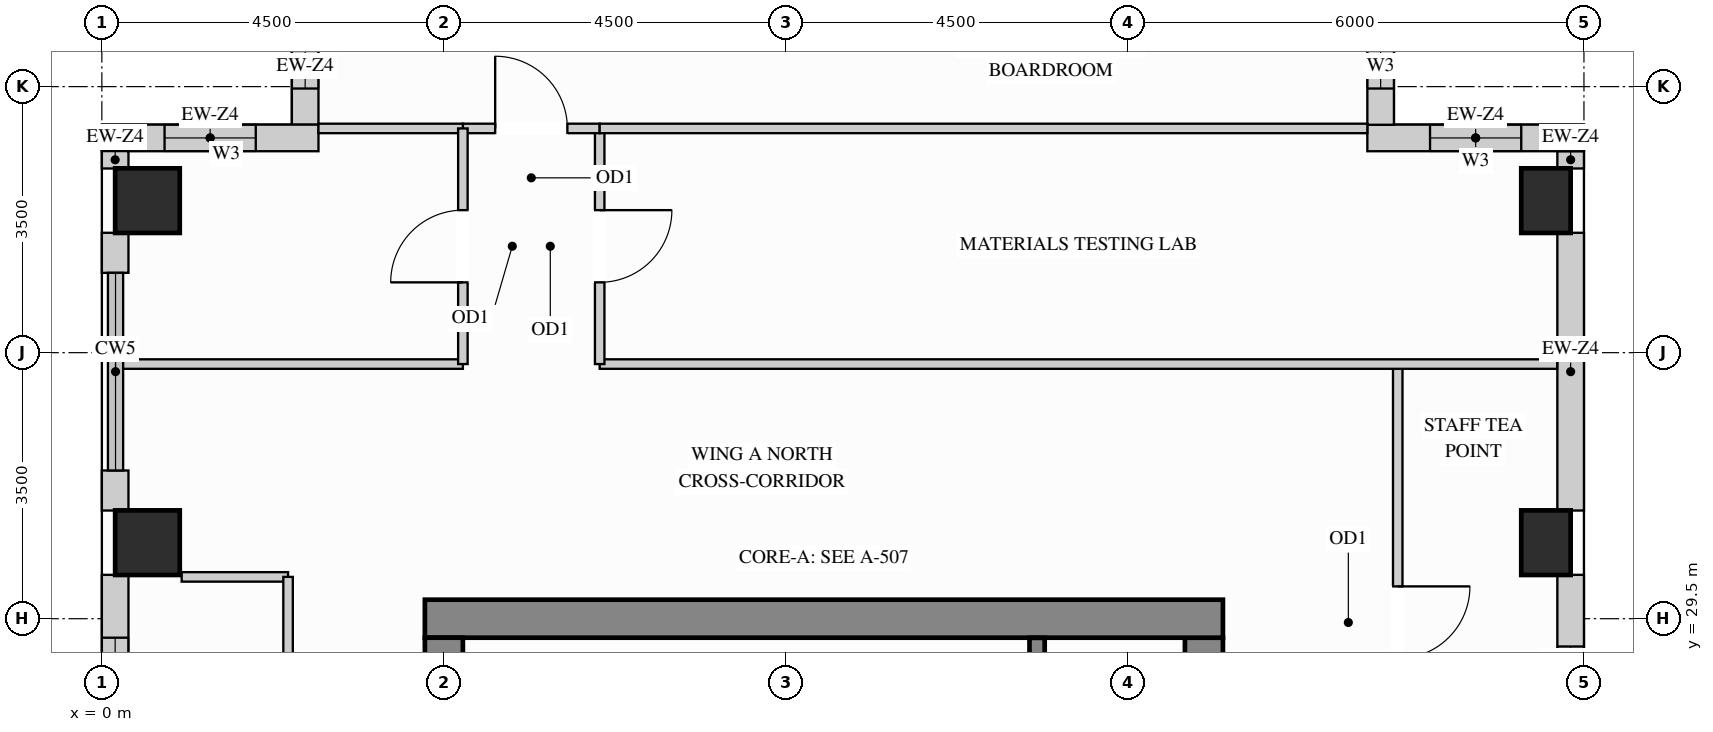
"""IFC4 building model, lengths in metres.
Left out: names, types, materials, properties, quantities, classifications, styles, units other than length and angle.
Written with IfcOpenShell. Run it as: python <this file> out.ifc"""

import sys

from ifc_helpers import new_model, si_unit, direction, frame, frame_2d, origin, origin_2d, place, context, subcontext, project, spatial, rectangle, extrude, source, transform, mapped, element, fill, save


model = new_model("IFC4")
c1 = context("Model", 3, precision=1e-05, world=origin(), true_north=direction((0.0, 1.0)))
c2 = subcontext(c1, "Body", "Model", "MODEL_VIEW")
j1 = project(units=[si_unit("LENGTHUNIT", "METRE"), si_unit("PLANEANGLEUNIT", "RADIAN")], contexts=[c1])
p1 = place(None, origin())
s1 = spatial("IfcSite", under=j1, at=p1, CompositionType="ELEMENT")
p2 = place(p1, origin())
s2 = spatial("IfcBuilding", under=s1, at=p2, CompositionType="ELEMENT")
p3 = place(p2, frame((0.0, 0.0, 252.0)))
s3 = spatial("IfcBuildingStorey", under=s2, at=p3, CompositionType="ELEMENT", Elevation=252.0)
m1 = source(origin(), c2, "Body", "SweptSolid", [
    extrude(rectangle(XDim=0.65, YDim=0.85, at=origin_2d()), origin(), (0.0, 0.0, 1.0), 3.4),
])
for number, where, z_axis, x_axis in (
    (1, (19.0, 30.5, 0.0), (0.0, 0.0, 1.0), (1.0, 0.0, 0.0)),
    (2, (19.0, 35.0, 0.0), (0.0, 0.0, 1.0), (1.0, 0.0, 0.0)),
):
    element("IfcColumn", number, at=place(p3, frame(where, z_axis=z_axis, x_axis=x_axis)), inside=s3, PredefinedType="COLUMN", context=c2, shape_type="MappedRepresentation", body=[
        mapped(m1, transform((0.0, 0.0, 0.0), x_axis=(1.0, 0.0, 0.0), y_axis=(0.0, 1.0, 0.0), z_axis=(0.0, 0.0, 1.0))),
    ])
m2 = source(origin(), c2, "Body", "SweptSolid", [
    extrude(rectangle(XDim=0.85, YDim=0.85, at=origin_2d()), origin(), (0.0, 0.0, 1.0), 3.4),
])
for number, where, z_axis, x_axis in (
    (3, (0.6, 30.5, 0.0), (0.0, 0.0, 1.0), (1.0, 0.0, 0.0)),
    (4, (0.6, 35.0, 0.0), (0.0, 0.0, 1.0), (1.0, 0.0, 0.0)),
):
    element("IfcColumn", number, at=place(p3, frame(where, z_axis=z_axis, x_axis=x_axis)), inside=s3, PredefinedType="COLUMN", context=c2, shape_type="MappedRepresentation", body=[
        mapped(m2, transform((0.0, 0.0, 0.0), x_axis=(1.0, 0.0, 0.0), y_axis=(0.0, 1.0, 0.0), z_axis=(0.0, 0.0, 1.0))),
    ])
m3 = source(origin(), c2, "Body", "SweptSolid", [
    extrude(rectangle(XDim=8.37, YDim=0.5, at=frame_2d((4.185, 0.0))), origin(), (0.0, 0.0, 1.0), 3.4),
])
p4 = place(p3, frame((14.5, 20.88, 0.0), z_axis=(0.0, 0.0, 1.0), x_axis=(0.0, 1.0, 0.0)))
e5 = element("IfcWall", 5, at=p4, inside=s3, PredefinedType="SHEAR", context=c2, shape_type="MappedRepresentation", body=[
    mapped(m3, transform((0.0, 0.0, 0.0), x_axis=(1.0, 0.0, 0.0), y_axis=(0.0, 1.0, 0.0), z_axis=(0.0, 0.0, 1.0))),
])
m4 = source(origin(), c2, "Body", "SweptSolid", [
    extrude(rectangle(XDim=10.5, YDim=0.5, at=frame_2d((5.25, 0.0))), origin(), (0.0, 0.0, 1.0), 3.4),
])
p5 = place(p3, frame((4.25, 29.5, 0.0), z_axis=(0.0, 0.0, 1.0), x_axis=(1.0, 0.0, 0.0)))
e6 = element("IfcWall", 6, at=p5, inside=s3, PredefinedType="SHEAR", context=c2, shape_type="MappedRepresentation", body=[
    mapped(m4, transform((0.0, 0.0, 0.0), x_axis=(1.0, 0.0, 0.0), y_axis=(0.0, 1.0, 0.0), z_axis=(0.0, 0.0, 1.0))),
])
m5 = source(origin(), c2, "Body", "SweptSolid", [
    extrude(rectangle(XDim=20.5, YDim=0.5, at=frame_2d((10.25, 0.0))), origin(), (0.0, 0.0, 1.0), 3.4),
])
p6 = place(p3, frame((4.5, 8.75, 0.0), z_axis=(0.0, 0.0, 1.0), x_axis=(0.0, 1.0, 0.0)))
e7 = element("IfcWall", 7, at=p6, inside=s3, PredefinedType="SHEAR", context=c2, shape_type="MappedRepresentation", body=[
    mapped(m5, transform((0.0, 0.0, 0.0), x_axis=(1.0, 0.0, 0.0), y_axis=(0.0, 1.0, 0.0), z_axis=(0.0, 0.0, 1.0))),
])
p7 = place(p3, frame((19.325, 27.223, 0.0), z_axis=(0.0, 0.0, 1.0), x_axis=(0.0, 1.0, 0.0)))
e8 = element("IfcWall", 8, at=p7, inside=s3, PredefinedType="SOLIDWALL", context=c2, shape_type="SweptSolid", body=[
    extrude(rectangle(XDim=2.854, YDim=0.35, at=frame_2d((1.427, 0.0))), origin(), (0.0, 0.0, 1.0), 2.619),
])
p8 = place(p7, frame((0.411, 0.0, 0.78)))
e9 = element("IfcOpeningElement", 9, at=p8, cuts=e8, PredefinedType="OPENING", context=c2, shape_type="SweptSolid", body=[
    extrude(rectangle(XDim=1.5, YDim=1.659, at=frame_2d((0.75, 0.83))), frame((0.0, 0.185, 0.0), z_axis=(0.0, -1.0, 0.0), x_axis=(1.0, 0.0, 0.0)), (0.0, 0.0, 1.0), 0.37),
])
m6 = source(origin(), c2, "Body", "SweptSolid", [
    extrude(rectangle(XDim=3.654, YDim=0.35, at=frame_2d((1.827, 0.0))), origin(), (0.0, 0.0, 1.0), 2.619),
])
p9 = place(p3, frame((19.325, 30.923, 0.0), z_axis=(0.0, 0.0, 1.0), x_axis=(0.0, 1.0, 0.0)))
e10 = element("IfcWall", 10, at=p9, inside=s3, PredefinedType="SOLIDWALL", context=c2, shape_type="MappedRepresentation", body=[
    mapped(m6, transform((0.0, 0.0, 0.0), x_axis=(1.0, 0.0, 0.0), y_axis=(0.0, 1.0, 0.0), z_axis=(0.0, 0.0, 1.0))),
])
m7 = source(origin(), c2, "Body", "SweptSolid", [
    extrude(rectangle(XDim=0.229, YDim=0.35, at=frame_2d((0.115, 0.0))), origin(), (0.0, 0.0, 1.0), 3.385),
])
p10 = place(p3, frame((19.325, 35.423, 0.0), z_axis=(0.0, 0.0, 1.0), x_axis=(0.0, 1.0, 0.0)))
e11 = element("IfcWall", 11, at=p10, inside=s3, PredefinedType="SOLIDWALL", context=c2, shape_type="MappedRepresentation", body=[
    mapped(m7, transform((0.0, 0.0, 0.0), x_axis=(1.0, 0.0, 0.0), y_axis=(0.0, 1.0, 0.0), z_axis=(0.0, 0.0, 1.0))),
])
p11 = place(p3, frame((19.5, 35.825, 0.0), z_axis=(0.0, 0.0, 1.0), x_axis=(-1.0, 0.0, 0.0)))
e12 = element("IfcWall", 12, at=p11, inside=s3, PredefinedType="SOLIDWALL", context=c2, shape_type="SweptSolid", body=[
    extrude(rectangle(XDim=2.85, YDim=0.35, at=frame_2d((1.425, 0.0))), origin(), (0.0, 0.0, 1.0), 3.385),
])
p12 = place(p11, frame((0.825, 0.0, 0.78)))
e13 = element("IfcOpeningElement", 13, at=p12, cuts=e12, PredefinedType="OPENING", context=c2, shape_type="SweptSolid", body=[
    extrude(rectangle(XDim=1.2, YDim=2.25, at=frame_2d((0.6, 1.125))), frame((0.0, 0.185, 0.0), z_axis=(0.0, -1.0, 0.0), x_axis=(1.0, 0.0, 0.0)), (0.0, 0.0, 1.0), 0.37),
])
p13 = place(p3, frame((16.825, 35.998, 0.0), z_axis=(0.0, 0.0, 1.0), x_axis=(0.0, 1.0, 0.0)))
e14 = element("IfcWall", 14, at=p13, inside=s3, PredefinedType="SOLIDWALL", context=c2, shape_type="SweptSolid", body=[
    extrude(rectangle(XDim=2.154, YDim=0.35, at=frame_2d((1.077, 0.0))), origin(), (0.0, 0.0, 1.0), 3.385),
])
p14 = place(p13, frame((0.477, 0.0, 0.78)))
e15 = element("IfcOpeningElement", 15, at=p14, cuts=e14, PredefinedType="OPENING", context=c2, shape_type="SweptSolid", body=[
    extrude(rectangle(XDim=1.2, YDim=2.25, at=frame_2d((0.6, 1.125))), frame((0.0, 0.185, 0.0), z_axis=(0.0, -1.0, 0.0), x_axis=(1.0, 0.0, 0.0)), (0.0, 0.0, 1.0), 0.37),
])
p15 = place(p3, frame((2.675, 38.152, 0.0), z_axis=(0.0, 0.0, 1.0), x_axis=(0.0, -1.0, 0.0)))
e16 = element("IfcWall", 16, at=p15, inside=s3, PredefinedType="SOLIDWALL", context=c2, shape_type="SweptSolid", body=[
    extrude(rectangle(XDim=2.154, YDim=0.35, at=frame_2d((1.077, 0.0))), origin(), (0.0, 0.0, 1.0), 3.385),
])
p16 = place(p15, frame((0.477, 0.0, 0.78)))
e17 = element("IfcOpeningElement", 17, at=p16, cuts=e16, PredefinedType="OPENING", context=c2, shape_type="SweptSolid", body=[
    extrude(rectangle(XDim=1.2, YDim=2.25, at=frame_2d((0.6, 1.125))), frame((0.0, 0.185, 0.0), z_axis=(0.0, -1.0, 0.0), x_axis=(1.0, 0.0, 0.0)), (0.0, 0.0, 1.0), 0.37),
])
p17 = place(p3, frame((2.85, 35.825, 0.0), z_axis=(0.0, 0.0, 1.0), x_axis=(-1.0, 0.0, 0.0)))
e18 = element("IfcWall", 18, at=p17, inside=s3, PredefinedType="SOLIDWALL", context=c2, shape_type="SweptSolid", body=[
    extrude(rectangle(XDim=2.85, YDim=0.35, at=frame_2d((1.425, 0.0))), origin(), (0.0, 0.0, 1.0), 3.385),
])
p18 = place(p17, frame((0.825, 0.0, 0.78)))
e19 = element("IfcOpeningElement", 19, at=p18, cuts=e18, PredefinedType="OPENING", context=c2, shape_type="SweptSolid", body=[
    extrude(rectangle(XDim=1.2, YDim=2.25, at=frame_2d((0.6, 1.125))), frame((0.0, 0.185, 0.0), z_axis=(0.0, -1.0, 0.0), x_axis=(1.0, 0.0, 0.0)), (0.0, 0.0, 1.0), 0.37),
])
p19 = place(p3, frame((0.175, 35.652, 0.0), z_axis=(0.0, 0.0, 1.0), x_axis=(0.0, -1.0, 0.0)))
e20 = element("IfcWall", 20, at=p19, inside=s3, PredefinedType="SOLIDWALL", context=c2, shape_type="MappedRepresentation", body=[
    mapped(m7, transform((0.0, 0.0, 0.0), x_axis=(1.0, 0.0, 0.0), y_axis=(0.0, 1.0, 0.0), z_axis=(0.0, 0.0, 1.0))),
])
m8 = source(origin(), c2, "Body", "SweptSolid", [
    extrude(rectangle(XDim=0.527, YDim=0.35, at=frame_2d((0.263, 0.0))), origin(), (0.0, 0.0, 1.0), 3.385),
])
for number, where, z_axis, x_axis in (
    (21, (0.175, 34.577, 0.0), (0.0, 0.0, 1.0), (0.0, -1.0, 0.0)),
    (22, (0.175, 31.45, 0.0), (0.0, 0.0, 1.0), (0.0, -1.0, 0.0)),
):
    element("IfcWall", number, at=place(p3, frame(where, z_axis=z_axis, x_axis=x_axis)), inside=s3, PredefinedType="SOLIDWALL", context=c2, shape_type="MappedRepresentation", body=[
        mapped(m8, transform((0.0, 0.0, 0.0), x_axis=(1.0, 0.0, 0.0), y_axis=(0.0, 1.0, 0.0), z_axis=(0.0, 0.0, 1.0))),
    ])
p20 = place(p3, frame((0.175, 30.077, 0.0), z_axis=(0.0, 0.0, 1.0), x_axis=(0.0, -1.0, 0.0)))
e23 = element("IfcWall", 23, at=p20, inside=s3, PredefinedType="SOLIDWALL", context=c2, shape_type="SweptSolid", body=[
    extrude(rectangle(XDim=2.854, YDim=0.35, at=frame_2d((1.427, 0.0))), origin(), (0.0, 0.0, 1.0), 3.385),
])
p21 = place(p20, frame((0.827, 0.0, 0.78)))
e24 = element("IfcOpeningElement", 24, at=p21, cuts=e23, PredefinedType="OPENING", context=c2, shape_type="SweptSolid", body=[
    extrude(rectangle(XDim=1.2, YDim=2.25, at=frame_2d((0.6, 1.125))), frame((0.0, 0.185, 0.0), z_axis=(0.0, -1.0, 0.0), x_axis=(1.0, 0.0, 0.0)), (0.0, 0.0, 1.0), 0.37),
])
p22 = place(p3, frame((17.05, 26.05, 0.0), z_axis=(0.0, 0.0, 1.0), x_axis=(0.0, 1.0, 0.0)))
e25 = element("IfcWall", 25, at=p22, inside=s3, PredefinedType="PARTITIONING", context=c2, shape_type="SweptSolid", body=[
    extrude(rectangle(XDim=6.8, YDim=0.125, at=frame_2d((3.4, 0.0))), origin(), (0.0, 0.0, 1.0), 3.385),
])
p23 = place(p22, frame((2.925, 0.0, 0.0)))
e26 = element("IfcOpeningElement", 26, at=p23, cuts=e25, PredefinedType="OPENING", context=c2, shape_type="SweptSolid", body=[
    extrude(rectangle(XDim=0.95, YDim=2.15, at=frame_2d((0.475, 1.075))), frame((0.0, 0.073, 0.0), z_axis=(0.0, -1.0, 0.0), x_axis=(1.0, 0.0, 0.0)), (0.0, 0.0, 1.0), 0.145),
])
m9 = source(origin(), c2, "Body", "SweptSolid", [
    extrude(rectangle(XDim=12.598, YDim=0.125, at=frame_2d((6.299, 0.0))), origin(), (0.0, 0.0, 1.0), 3.385),
])
p24 = place(p3, frame((6.55, 32.85, 0.0), z_axis=(0.0, 0.0, 1.0), x_axis=(1.0, 0.0, 0.0)))
e27 = element("IfcWall", 27, at=p24, inside=s3, PredefinedType="PARTITIONING", context=c2, shape_type="MappedRepresentation", body=[
    mapped(m9, transform((0.0, 0.0, 0.0), x_axis=(1.0, 0.0, 0.0), y_axis=(0.0, 1.0, 0.0), z_axis=(0.0, 0.0, 1.0))),
])
m10 = source(origin(), c2, "Body", "SweptSolid", [
    extrude(rectangle(XDim=4.54, YDim=0.125, at=frame_2d((2.27, 0.0))), origin(), (0.0, 0.0, 1.0), 3.385),
])
p25 = place(p3, frame((0.21, 32.85, 0.0), z_axis=(0.0, 0.0, 1.0), x_axis=(1.0, 0.0, 0.0)))
e28 = element("IfcWall", 28, at=p25, inside=s3, PredefinedType="PARTITIONING", context=c2, shape_type="MappedRepresentation", body=[
    mapped(m10, transform((0.0, 0.0, 0.0), x_axis=(1.0, 0.0, 0.0), y_axis=(0.0, 1.0, 0.0), z_axis=(0.0, 0.0, 1.0))),
])
m11 = source(origin(), c2, "Body", "SweptSolid", [
    extrude(rectangle(XDim=1.4, YDim=0.125, at=frame_2d((0.7, 0.0))), origin(), (0.0, 0.0, 1.0), 3.385),
])
p26 = place(p3, frame((1.05, 30.05, 0.0), z_axis=(0.0, 0.0, 1.0), x_axis=(1.0, 0.0, 0.0)))
e29 = element("IfcWall", 29, at=p26, inside=s3, PredefinedType="PARTITIONING", context=c2, shape_type="MappedRepresentation", body=[
    mapped(m11, transform((0.0, 0.0, 0.0), x_axis=(1.0, 0.0, 0.0), y_axis=(0.0, 1.0, 0.0), z_axis=(0.0, 0.0, 1.0))),
])
p27 = place(p3, frame((6.55, 32.85, 0.0), z_axis=(0.0, 0.0, 1.0), x_axis=(0.0, 1.0, 0.0)))
e30 = element("IfcWall", 30, at=p27, inside=s3, PredefinedType="PARTITIONING", context=c2, shape_type="SweptSolid", body=[
    extrude(rectangle(XDim=3.1, YDim=0.125, at=frame_2d((1.55, 0.0))), origin(), (0.0, 0.0, 1.0), 3.385),
])
p28 = place(p27, frame((1.075, 0.0, 0.0)))
e31 = element("IfcOpeningElement", 31, at=p28, cuts=e30, PredefinedType="OPENING", context=c2, shape_type="SweptSolid", body=[
    extrude(rectangle(XDim=0.95, YDim=2.15, at=frame_2d((0.475, 1.075))), frame((0.0, 0.073, 0.0), z_axis=(0.0, -1.0, 0.0), x_axis=(1.0, 0.0, 0.0)), (0.0, 0.0, 1.0), 0.145),
])
p29 = place(p3, frame((4.75, 35.95, 0.0), z_axis=(0.0, 0.0, 1.0), x_axis=(1.0, 0.0, 0.0)))
e32 = element("IfcWall", 32, at=p29, inside=s3, PredefinedType="PARTITIONING", context=c2, shape_type="SweptSolid", body=[
    extrude(rectangle(XDim=1.8, YDim=0.125, at=frame_2d((0.9, 0.0))), origin(), (0.0, 0.0, 1.0), 3.385),
])
p30 = place(p29, frame((0.425, 0.0, 0.0)))
e33 = element("IfcOpeningElement", 33, at=p30, cuts=e32, PredefinedType="OPENING", context=c2, shape_type="SweptSolid", body=[
    extrude(rectangle(XDim=0.95, YDim=2.15, at=frame_2d((0.475, 1.075))), frame((0.0, 0.073, 0.0), z_axis=(0.0, -1.0, 0.0), x_axis=(1.0, 0.0, 0.0)), (0.0, 0.0, 1.0), 0.145),
])
m12 = source(origin(), c2, "Body", "SweptSolid", [
    extrude(rectangle(XDim=10.1, YDim=0.125, at=frame_2d((5.05, 0.0))), origin(), (0.0, 0.0, 1.0), 3.385),
])
p31 = place(p3, frame((6.55, 35.95, 0.0), z_axis=(0.0, 0.0, 1.0), x_axis=(1.0, 0.0, 0.0)))
e34 = element("IfcWall", 34, at=p31, inside=s3, PredefinedType="PARTITIONING", context=c2, shape_type="MappedRepresentation", body=[
    mapped(m12, transform((0.0, 0.0, 0.0), x_axis=(1.0, 0.0, 0.0), y_axis=(0.0, 1.0, 0.0), z_axis=(0.0, 0.0, 1.0))),
])
m13 = source(origin(), c2, "Body", "SweptSolid", [
    extrude(rectangle(XDim=1.9, YDim=0.125, at=frame_2d((0.95, 0.0))), origin(), (0.0, 0.0, 1.0), 3.385),
])
p32 = place(p3, frame((2.85, 35.95, 0.0), z_axis=(0.0, 0.0, 1.0), x_axis=(1.0, 0.0, 0.0)))
e35 = element("IfcWall", 35, at=p32, inside=s3, PredefinedType="PARTITIONING", context=c2, shape_type="MappedRepresentation", body=[
    mapped(m13, transform((0.0, 0.0, 0.0), x_axis=(1.0, 0.0, 0.0), y_axis=(0.0, 1.0, 0.0), z_axis=(0.0, 0.0, 1.0))),
])
p33 = place(p3, frame((4.75, 32.85, 0.0), z_axis=(0.0, 0.0, 1.0), x_axis=(0.0, 1.0, 0.0)))
e36 = element("IfcWall", 36, at=p33, inside=s3, PredefinedType="PARTITIONING", context=c2, shape_type="SweptSolid", body=[
    extrude(rectangle(XDim=3.1, YDim=0.125, at=frame_2d((1.55, 0.0))), origin(), (0.0, 0.0, 1.0), 3.385),
])
p34 = place(p33, frame((1.075, 0.0, 0.0)))
e37 = element("IfcOpeningElement", 37, at=p34, cuts=e36, PredefinedType="OPENING", context=c2, shape_type="SweptSolid", body=[
    extrude(rectangle(XDim=0.95, YDim=2.15, at=frame_2d((0.475, 1.075))), frame((0.0, 0.073, 0.0), z_axis=(0.0, -1.0, 0.0), x_axis=(1.0, 0.0, 0.0)), (0.0, 0.0, 1.0), 0.145),
])
p35 = place(p3, frame((2.45, 22.6, 0.0), z_axis=(0.0, 0.0, 1.0), x_axis=(0.0, 1.0, 0.0)))
e38 = element("IfcWall", 38, at=p35, inside=s3, PredefinedType="PARTITIONING", context=c2, shape_type="SweptSolid", body=[
    extrude(rectangle(XDim=7.45, YDim=0.125, at=frame_2d((3.725, 0.0))), origin(), (0.0, 0.0, 1.0), 3.385),
])
p36 = place(p35, frame((3.25, 0.0, 0.0)))
e39 = element("IfcOpeningElement", 39, at=p36, cuts=e38, PredefinedType="OPENING", context=c2, shape_type="SweptSolid", body=[
    extrude(rectangle(XDim=0.95, YDim=2.15, at=frame_2d((0.475, 1.075))), frame((0.0, 0.073, 0.0), z_axis=(0.0, -1.0, 0.0), x_axis=(1.0, 0.0, 0.0)), (0.0, 0.0, 1.0), 0.145),
])
m14 = source(origin(), c2, "Body", "SweptSolid", [
    extrude(rectangle(XDim=3.803, YDim=0.2, at=frame_2d((1.901, 0.0))), origin(), (0.0, 0.0, 1.0), 3.4),
])
p37 = place(p3, frame((12.305, 25.445, 0.0), z_axis=(0.0, 0.0, 1.0), x_axis=(0.0, 1.0, 0.0)))
e40 = element("IfcWall", 40, at=p37, inside=s3, PredefinedType="SHEAR", context=c2, shape_type="MappedRepresentation", body=[
    mapped(m14, transform((0.0, 0.0, 0.0), x_axis=(1.0, 0.0, 0.0), y_axis=(0.0, 1.0, 0.0), z_axis=(0.0, 0.0, 1.0))),
])
m15 = source(origin(), c2, "Body", "SweptSolid", [
    extrude(rectangle(XDim=0.95, YDim=2.15, at=frame_2d((0.475, 1.075))), frame((0.0, 0.025, 0.0), z_axis=(0.0, -1.0, 0.0), x_axis=(1.0, 0.0, 0.0)), (0.0, 0.0, 1.0), 0.05),
])
p38 = place(p23, origin())
e41 = element("IfcDoor", 41, at=p38, inside=s3, OperationType="SINGLE_SWING_RIGHT", PredefinedType="DOOR", context=c2, shape_type="MappedRepresentation", body=[
    mapped(m15, transform((0.0, 0.0, 0.0), x_axis=(1.0, 0.0, 0.0), y_axis=(0.0, 1.0, 0.0), z_axis=(0.0, 0.0, 1.0))),
])
fill(e26, e41)
p39 = place(p28, origin())
e42 = element("IfcDoor", 42, at=p39, inside=s3, OperationType="SINGLE_SWING_RIGHT", PredefinedType="DOOR", context=c2, shape_type="MappedRepresentation", body=[
    mapped(m15, transform((0.0, 0.0, 0.0), x_axis=(1.0, 0.0, 0.0), y_axis=(0.0, 1.0, 0.0), z_axis=(0.0, 0.0, 1.0))),
])
fill(e31, e42)
p40 = place(p30, origin())
e43 = element("IfcDoor", 43, at=p40, inside=s3, OperationType="SINGLE_SWING_LEFT", PredefinedType="DOOR", context=c2, shape_type="MappedRepresentation", body=[
    mapped(m15, transform((0.0, 0.0, 0.0), x_axis=(1.0, 0.0, 0.0), y_axis=(0.0, 1.0, 0.0), z_axis=(0.0, 0.0, 1.0))),
])
fill(e33, e43)
p41 = place(p34, origin())
e44 = element("IfcDoor", 44, at=p41, inside=s3, OperationType="SINGLE_SWING_LEFT", PredefinedType="DOOR", context=c2, shape_type="MappedRepresentation", body=[
    mapped(m15, transform((0.0, 0.0, 0.0), x_axis=(1.0, 0.0, 0.0), y_axis=(0.0, 1.0, 0.0), z_axis=(0.0, 0.0, 1.0))),
])
fill(e37, e44)
m16 = source(origin(), c2, "Body", "SweptSolid", [
    extrude(rectangle(XDim=1.2, YDim=2.25, at=frame_2d((0.6, 1.125))), frame((0.0, 0.03, 0.0), z_axis=(0.0, -1.0, 0.0), x_axis=(1.0, 0.0, 0.0)), (0.0, 0.0, 1.0), 0.06),
])
p42 = place(p12, origin())
e45 = element("IfcWindow", 45, at=p42, inside=s3, PartitioningType="SINGLE_PANEL", PredefinedType="WINDOW", context=c2, shape_type="MappedRepresentation", body=[
    mapped(m16, transform((0.0, 0.0, 0.0), x_axis=(1.0, 0.0, 0.0), y_axis=(0.0, 1.0, 0.0), z_axis=(0.0, 0.0, 1.0))),
])
fill(e13, e45)
p43 = place(p14, origin())
e46 = element("IfcWindow", 46, at=p43, inside=s3, PartitioningType="SINGLE_PANEL", PredefinedType="WINDOW", context=c2, shape_type="MappedRepresentation", body=[
    mapped(m16, transform((0.0, 0.0, 0.0), x_axis=(1.0, 0.0, 0.0), y_axis=(0.0, 1.0, 0.0), z_axis=(0.0, 0.0, 1.0))),
])
fill(e15, e46)
p44 = place(p16, origin())
e47 = element("IfcWindow", 47, at=p44, inside=s3, PartitioningType="SINGLE_PANEL", PredefinedType="WINDOW", context=c2, shape_type="MappedRepresentation", body=[
    mapped(m16, transform((0.0, 0.0, 0.0), x_axis=(1.0, 0.0, 0.0), y_axis=(0.0, 1.0, 0.0), z_axis=(0.0, 0.0, 1.0))),
])
fill(e17, e47)
p45 = place(p18, origin())
e48 = element("IfcWindow", 48, at=p45, inside=s3, PartitioningType="SINGLE_PANEL", PredefinedType="WINDOW", context=c2, shape_type="MappedRepresentation", body=[
    mapped(m16, transform((0.0, 0.0, 0.0), x_axis=(1.0, 0.0, 0.0), y_axis=(0.0, 1.0, 0.0), z_axis=(0.0, 0.0, 1.0))),
])
fill(e19, e48)
p46 = place(p21, origin())
e49 = element("IfcWindow", 49, at=p46, inside=s3, PartitioningType="SINGLE_PANEL", PredefinedType="WINDOW", context=c2, shape_type="MappedRepresentation", body=[
    mapped(m16, transform((0.0, 0.0, 0.0), x_axis=(1.0, 0.0, 0.0), y_axis=(0.0, 1.0, 0.0), z_axis=(0.0, 0.0, 1.0))),
])
fill(e24, e49)
m17 = source(origin(), c2, "Body", "SweptSolid", [
    extrude(rectangle(XDim=1.5, YDim=1.659, at=frame_2d((0.75, 0.83))), frame((0.0, 0.03, 0.0), z_axis=(0.0, -1.0, 0.0), x_axis=(1.0, 0.0, 0.0)), (0.0, 0.0, 1.0), 0.06),
])
p47 = place(p8, origin())
e50 = element("IfcWindow", 50, at=p47, inside=s3, PartitioningType="SINGLE_PANEL", PredefinedType="WINDOW", context=c2, shape_type="MappedRepresentation", body=[
    mapped(m17, transform((0.0, 0.0, 0.0), x_axis=(1.0, 0.0, 0.0), y_axis=(0.0, 1.0, 0.0), z_axis=(0.0, 0.0, 1.0))),
])
fill(e9, e50)
save(model, sys.argv[1])
